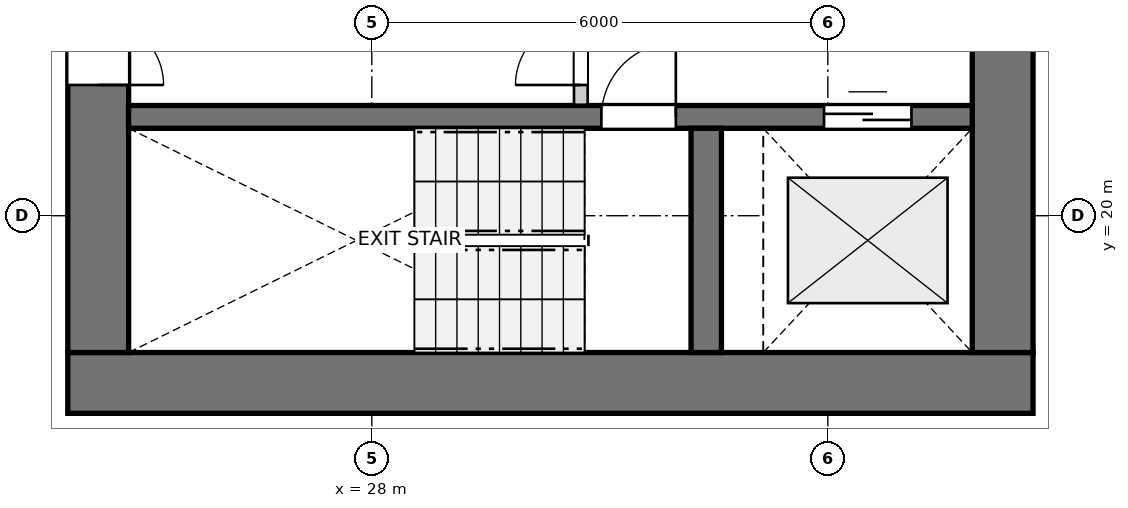
"""IFC4 building model, lengths in metres.
Left out: names, types, materials, properties, quantities, classifications, styles, units other than length and angle.
Written with IfcOpenShell. Run it as: python <this file> out.ifc"""

import sys

from ifc_helpers import new_model, si_unit, direction, frame, frame_2d, origin, place, context, subcontext, project, spatial, rectangle, extrude, source, transform, mapped, element, fill, save


model = new_model("IFC4")
c1 = context("Model", 3, precision=1e-05, world=origin(), true_north=direction((0.0, 1.0)))
c2 = subcontext(c1, "Body", "Model", "MODEL_VIEW")
j1 = project(units=[si_unit("LENGTHUNIT", "METRE"), si_unit("PLANEANGLEUNIT", "RADIAN")], contexts=[c1])
p1 = place(None, origin())
s1 = spatial("IfcSite", under=j1, at=p1, CompositionType="ELEMENT")
p2 = place(p1, origin())
s2 = spatial("IfcBuilding", under=s1, at=p2, CompositionType="ELEMENT")
p3 = place(p2, frame((0.0, 0.0, 7.8)))
s3 = spatial("IfcBuildingStorey", under=s2, at=p3, CompositionType="ELEMENT", Elevation=7.8)
p4 = place(p3, frame((24.0, 17.8, 0.0), z_axis=(0.0, 0.0, 1.0), x_axis=(1.0, 0.0, 0.0)))
e1 = element("IfcWall", 1, at=p4, inside=s3, PredefinedType="SHEAR", context=c2, shape_type="SweptSolid", body=[
    extrude(rectangle(XDim=12.7, YDim=0.8, at=frame_2d((6.35, 0.0))), origin(), (0.0, 0.0, 1.0), 2.94),
])
p5 = place(p3, frame((24.4, 33.8, 0.0), z_axis=(0.0, 0.0, 1.0), x_axis=(0.0, -1.0, 0.0)))
e2 = element("IfcWall", 2, at=p5, inside=s3, PredefinedType="SHEAR", context=c2, shape_type="SweptSolid", body=[
    extrude(rectangle(XDim=15.6, YDim=0.8, at=frame_2d((7.8, 0.0))), origin(), (0.0, 0.0, 1.0), 2.94),
])
p6 = place(p5, frame((7.05, 0.0, 0.0)))
e3 = element("IfcOpeningElement", 3, at=p6, cuts=e2, PredefinedType="OPENING", context=c2, shape_type="SweptSolid", body=[
    extrude(rectangle(XDim=1.5, YDim=2.15, at=frame_2d((0.75, 1.075))), frame((0.0, 0.41, 0.0), z_axis=(0.0, -1.0, 0.0), x_axis=(1.0, 0.0, 0.0)), (0.0, 0.0, 1.0), 0.82),
])
p7 = place(p5, frame((3.52, 0.0, 0.0)))
e4 = element("IfcOpeningElement", 4, at=p7, cuts=e2, PredefinedType="OPENING", context=c2, shape_type="SweptSolid", body=[
    extrude(rectangle(XDim=0.86, YDim=2.05, at=frame_2d((0.43, 1.025))), frame((0.0, 0.41, 0.0), z_axis=(0.0, -1.0, 0.0), x_axis=(1.0, 0.0, 0.0)), (0.0, 0.0, 1.0), 0.82),
])
p8 = place(p5, frame((11.22, 0.0, 0.0)))
e5 = element("IfcOpeningElement", 5, at=p8, cuts=e2, PredefinedType="OPENING", context=c2, shape_type="SweptSolid", body=[
    extrude(rectangle(XDim=0.86, YDim=2.05, at=frame_2d((0.43, 1.025))), frame((0.0, 0.41, 0.0), z_axis=(0.0, -1.0, 0.0), x_axis=(1.0, 0.0, 0.0)), (0.0, 0.0, 1.0), 0.82),
])
p9 = place(p3, frame((36.3, 18.2, 0.0), z_axis=(0.0, 0.0, 1.0), x_axis=(0.0, 1.0, 0.0)))
e6 = element("IfcWall", 6, at=p9, inside=s3, PredefinedType="SHEAR", context=c2, shape_type="SweptSolid", body=[
    extrude(rectangle(XDim=15.6, YDim=0.8, at=frame_2d((7.8, 0.0))), origin(), (0.0, 0.0, 1.0), 2.94),
])
p10 = place(p9, frame((4.25, 0.0, 0.0)))
e7 = element("IfcOpeningElement", 7, at=p10, cuts=e6, PredefinedType="OPENING", context=c2, shape_type="SweptSolid", body=[
    extrude(rectangle(XDim=1.1, YDim=2.15, at=frame_2d((0.55, 1.075))), frame((0.0, 0.41, 0.0), z_axis=(0.0, -1.0, 0.0), x_axis=(1.0, 0.0, 0.0)), (0.0, 0.0, 1.0), 0.82),
])
p11 = place(p9, frame((10.25, 0.0, 0.0)))
e8 = element("IfcOpeningElement", 8, at=p11, cuts=e6, PredefinedType="OPENING", context=c2, shape_type="SweptSolid", body=[
    extrude(rectangle(XDim=1.1, YDim=2.15, at=frame_2d((0.55, 1.075))), frame((0.0, 0.41, 0.0), z_axis=(0.0, -1.0, 0.0), x_axis=(1.0, 0.0, 0.0)), (0.0, 0.0, 1.0), 0.82),
])
p12 = place(p3, frame((24.8, 21.3, 0.0), z_axis=(0.0, 0.0, 1.0), x_axis=(1.0, 0.0, 0.0)))
e9 = element("IfcWall", 9, at=p12, inside=s3, PredefinedType="SHEAR", context=c2, shape_type="SweptSolid", body=[
    extrude(rectangle(XDim=11.1, YDim=0.3, at=frame_2d((5.55, 0.0))), origin(), (0.0, 0.0, 1.0), 2.94),
])
p13 = place(p12, frame((6.22, 0.0, 0.0)))
e10 = element("IfcOpeningElement", 10, at=p13, cuts=e9, PredefinedType="OPENING", context=c2, shape_type="SweptSolid", body=[
    extrude(rectangle(XDim=0.98, YDim=2.15, at=frame_2d((0.49, 1.075))), frame((0.0, 0.16, 0.0), z_axis=(0.0, -1.0, 0.0), x_axis=(1.0, 0.0, 0.0)), (0.0, 0.0, 1.0), 0.32),
])
p14 = place(p12, frame((9.15, 0.0, 0.0)))
e11 = element("IfcOpeningElement", 11, at=p14, cuts=e9, PredefinedType="OPENING", context=c2, shape_type="SweptSolid", body=[
    extrude(rectangle(XDim=1.15, YDim=2.15, at=frame_2d((0.575, 1.075))), frame((0.0, 0.16, 0.0), z_axis=(0.0, -1.0, 0.0), x_axis=(1.0, 0.0, 0.0)), (0.0, 0.0, 1.0), 0.32),
])
p15 = place(p3, frame((32.4, 18.2, 0.0), z_axis=(0.0, 0.0, 1.0), x_axis=(0.0, 1.0, 0.0)))
e12 = element("IfcWall", 12, at=p15, inside=s3, PredefinedType="SHEAR", context=c2, shape_type="SweptSolid", body=[
    extrude(rectangle(XDim=2.95, YDim=0.4, at=frame_2d((1.475, 0.0))), origin(), (0.0, 0.0, 1.0), 2.94),
])
p16 = place(p3, frame((30.75, 21.46, 0.0), z_axis=(0.0, 0.0, 1.0), x_axis=(0.0, 1.0, 0.0)))
e13 = element("IfcWall", 13, at=p16, inside=s3, PredefinedType="PARTITIONING", context=c2, shape_type="SweptSolid", body=[
    extrude(rectangle(XDim=3.11, YDim=0.18, at=frame_2d((1.555, 0.0))), origin(), (0.0, 0.0, 1.0), 2.94),
])
p17 = place(p16, frame((0.26, 0.0, 0.0)))
e14 = element("IfcOpeningElement", 14, at=p17, cuts=e13, PredefinedType="OPENING", context=c2, shape_type="SweptSolid", body=[
    extrude(rectangle(XDim=0.86, YDim=2.05, at=frame_2d((0.43, 1.025))), frame((0.0, 0.1, 0.0), z_axis=(0.0, -1.0, 0.0), x_axis=(1.0, 0.0, 0.0)), (0.0, 0.0, 1.0), 0.2),
])
m1 = source(origin(), c2, "Body", "SweptSolid", [
    extrude(rectangle(XDim=0.98, YDim=2.15, at=frame_2d((0.49, 1.075))), frame((0.0, 0.025, 0.0), z_axis=(0.0, -1.0, 0.0), x_axis=(1.0, 0.0, 0.0)), (0.0, 0.0, 1.0), 0.05),
])
p18 = place(p13, origin())
e15 = element("IfcDoor", 15, at=p18, inside=s3, OperationType="SINGLE_SWING_RIGHT", PredefinedType="DOOR", context=c2, shape_type="MappedRepresentation", body=[
    mapped(m1, transform((0.0, 0.0, 0.0), x_axis=(1.0, 0.0, 0.0), y_axis=(0.0, 1.0, 0.0), z_axis=(0.0, 0.0, 1.0), scale=1.0)),
])
fill(e10, e15)
m2 = source(origin(), c2, "Body", "SweptSolid", [
    extrude(rectangle(XDim=1.15, YDim=2.15, at=frame_2d((0.575, 1.075))), frame((0.0, 0.025, 0.0), z_axis=(0.0, -1.0, 0.0), x_axis=(1.0, 0.0, 0.0)), (0.0, 0.0, 1.0), 0.05),
])
p19 = place(p14, origin())
e16 = element("IfcDoor", 16, at=p19, inside=s3, OperationType="DOUBLE_DOOR_SLIDING", PredefinedType="DOOR", context=c2, shape_type="MappedRepresentation", body=[
    mapped(m2, transform((0.0, 0.0, 0.0), x_axis=(1.0, 0.0, 0.0), y_axis=(0.0, 1.0, 0.0), z_axis=(0.0, 0.0, 1.0), scale=1.0)),
])
fill(e11, e16)
m3 = source(origin(), c2, "Body", "SweptSolid", [
    extrude(rectangle(XDim=0.86, YDim=2.05, at=frame_2d((0.43, 1.025))), frame((0.0, 0.025, 0.0), z_axis=(0.0, -1.0, 0.0), x_axis=(1.0, 0.0, 0.0)), (0.0, 0.0, 1.0), 0.05),
])
p20 = place(p8, origin())
e17 = element("IfcDoor", 17, at=p20, inside=s3, OperationType="SINGLE_SWING_RIGHT", PredefinedType="DOOR", context=c2, shape_type="MappedRepresentation", body=[
    mapped(m3, transform((0.0, 0.0, 0.0), x_axis=(1.0, 0.0, 0.0), y_axis=(0.0, 1.0, 0.0), z_axis=(0.0, 0.0, 1.0), scale=1.0)),
])
fill(e5, e17)
p21 = place(p17, origin())
e18 = element("IfcDoor", 18, at=p21, inside=s3, OperationType="SINGLE_SWING_LEFT", PredefinedType="DOOR", context=c2, shape_type="MappedRepresentation", body=[
    mapped(m3, transform((0.0, 0.0, 0.0), x_axis=(1.0, 0.0, 0.0), y_axis=(0.0, 1.0, 0.0), z_axis=(0.0, 0.0, 1.0), scale=1.0)),
])
fill(e14, e18)
save(model, sys.argv[1])
